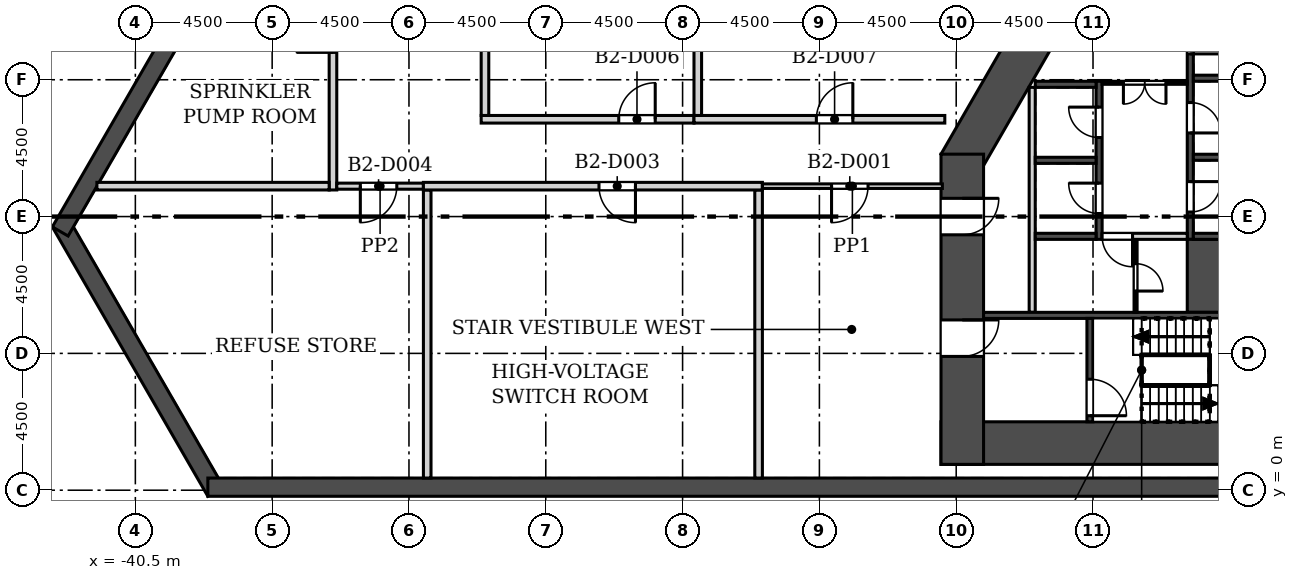
"""IFC4 building model, lengths in metres.
Left out: names, types, materials, properties, quantities, classifications, styles, units other than length and angle.
Written with IfcOpenShell. Run it as: python <this file> out.ifc"""

import sys

from ifc_helpers import new_model, si_unit, direction, frame, frame_2d, origin, place, context, subcontext, project, spatial, rectangle, extrude, element, fill, save


model = new_model("IFC4")
c1 = context("Model", 3, precision=1e-05, world=origin(), true_north=direction((0.0, 1.0)))
c2 = subcontext(c1, "Body", "Model", "MODEL_VIEW")
j1 = project(units=[si_unit("LENGTHUNIT", "METRE"), si_unit("PLANEANGLEUNIT", "RADIAN")], contexts=[c1])
p1 = place(None, origin())
s1 = spatial("IfcSite", under=j1, at=p1, CompositionType="ELEMENT")
p2 = place(p1, origin())
s2 = spatial("IfcBuilding", under=s1, at=p2, CompositionType="ELEMENT")
p3 = place(p2, frame((0.0, 0.0, -14.0)))
s3 = spatial("IfcBuildingStorey", under=s2, at=p3, CompositionType="ELEMENT", Elevation=-14.0)
p4 = place(p3, frame((-42.971, 8.81, -0.4), z_axis=(0.0, 0.0, 1.0), x_axis=(0.499996492717, -0.866027428706, 0.0)))
e1 = element("IfcWall", 1, at=p4, inside=s3, PredefinedType="SOLIDWALL", context=c2, shape_type="SweptSolid", body=[
    extrude(rectangle(XDim=10.231, YDim=0.6, at=frame_2d((5.115, 0.0))), origin(), (0.0, 0.0, 1.0), 6.4),
])
for number, where, z_axis, x_axis in (
    (2, (-38.115, 0.1, -0.4), (0.0, 0.0, 1.0), (1.0, 0.0, 0.0)),
    (3, (-4.856, 74.528, -0.4), (0.0, 0.0, 1.0), (-0.5, -0.866, 0.0)),
):
    element("IfcWall", number, at=place(p3, frame(where, z_axis=z_axis, x_axis=x_axis)), inside=s3, PredefinedType="SOLIDWALL", context=c2, shape_type="SweptSolid", body=[
        extrude(rectangle(XDim=76.231, YDim=0.6, at=frame_2d((38.115, 0.0))), origin(), (0.0, 0.0, 1.0), 6.4),
    ])
p5 = place(p3, frame((-14.0, 1.55, 0.0), z_axis=(0.0, 0.0, 1.0), x_axis=(1.0, 0.0, 0.0)))
e4 = element("IfcWall", 4, at=p5, inside=s3, PredefinedType="SHEAR", context=c2, shape_type="SweptSolid", body=[
    extrude(rectangle(XDim=28.0, YDim=1.4, at=frame_2d((14.0, 0.0))), origin(), (0.0, 0.0, 1.0), 6.0),
])
p6 = place(p3, frame((-8.805, 18.65, 0.0), z_axis=(0.0, 0.0, 1.0), x_axis=(-0.50000187635, -0.866024320471, 0.0)))
e5 = element("IfcWall", 5, at=p6, inside=s3, PredefinedType="SHEAR", context=c2, shape_type="SweptSolid", body=[
    extrude(rectangle(XDim=9.177, YDim=1.4, at=frame_2d((4.588, 0.0))), origin(), (0.0, 0.0, 1.0), 6.0),
])
p7 = place(p3, frame((-13.3, 11.052, 0.0), z_axis=(0.0, 0.0, 1.0), x_axis=(0.0, -1.0, 0.0)))
e6 = element("IfcWall", 6, at=p7, inside=s3, PredefinedType="SHEAR", context=c2, shape_type="SweptSolid", body=[
    extrude(rectangle(XDim=10.202, YDim=1.4, at=frame_2d((5.101, 0.0))), origin(), (0.0, 0.0, 1.0), 6.0),
])
p8 = place(p7, frame((5.453, 0.0, 0.0)))
e7 = element("IfcOpeningElement", 7, at=p8, cuts=e6, PredefinedType="OPENING", context=c2, shape_type="SweptSolid", body=[
    extrude(rectangle(XDim=1.2, YDim=2.1, at=frame_2d((0.6, 1.05))), frame((0.0, 0.71, 0.0), z_axis=(0.0, -1.0, 0.0), x_axis=(1.0, 0.0, 0.0)), (0.0, 0.0, 1.0), 1.42),
])
p9 = place(p7, frame((1.453, 0.0, 0.0)))
e8 = element("IfcOpeningElement", 8, at=p9, cuts=e6, PredefinedType="OPENING", context=c2, shape_type="SweptSolid", body=[
    extrude(rectangle(XDim=1.2, YDim=2.1, at=frame_2d((0.6, 1.05))), frame((0.0, 0.71, 0.0), z_axis=(0.0, -1.0, 0.0), x_axis=(1.0, 0.0, 0.0)), (0.0, 0.0, 1.0), 1.42),
])
p10 = place(p3, frame((-11.0, 5.85, 0.0), z_axis=(0.0, 0.0, 1.0), x_axis=(0.0, 1.0, 0.0)))
e9 = element("IfcWall", 9, at=p10, inside=s3, PredefinedType="SOLIDWALL", context=c2, shape_type="SweptSolid", body=[
    extrude(rectangle(XDim=7.4, YDim=0.2, at=frame_2d((3.7, 0.0))), origin(), (0.0, 0.0, 1.0), 5.65),
])
p11 = place(p3, frame((-8.8, 8.25, 0.0), z_axis=(0.0, 0.0, 1.0), x_axis=(0.0, 1.0, 0.0)))
e10 = element("IfcWall", 10, at=p11, inside=s3, PredefinedType="SOLIDWALL", context=c2, shape_type="SweptSolid", body=[
    extrude(rectangle(XDim=5.2, YDim=0.2, at=frame_2d((2.6, 0.0))), origin(), (0.0, 0.0, 1.0), 5.65),
])
p12 = place(p11, frame((0.85, 0.0, 0.0)))
e11 = element("IfcOpeningElement", 11, at=p12, cuts=e10, PredefinedType="OPENING", context=c2, shape_type="SweptSolid", body=[
    extrude(rectangle(XDim=1.0, YDim=2.1, at=frame_2d((0.5, 1.05))), frame((0.0, 0.11, 0.0), z_axis=(0.0, -1.0, 0.0), x_axis=(1.0, 0.0, 0.0)), (0.0, 0.0, 1.0), 0.22),
])
p13 = place(p11, frame((3.35, 0.0, 0.0)))
e12 = element("IfcOpeningElement", 12, at=p13, cuts=e10, PredefinedType="OPENING", context=c2, shape_type="SweptSolid", body=[
    extrude(rectangle(XDim=1.0, YDim=2.1, at=frame_2d((0.5, 1.05))), frame((0.0, 0.11, 0.0), z_axis=(0.0, -1.0, 0.0), x_axis=(1.0, 0.0, 0.0)), (0.0, 0.0, 1.0), 0.22),
])
p14 = place(p3, frame((-5.8, 8.25, 0.0), z_axis=(0.0, 0.0, 1.0), x_axis=(0.0, 1.0, 0.0)))
e13 = element("IfcWall", 13, at=p14, inside=s3, PredefinedType="SOLIDWALL", context=c2, shape_type="SweptSolid", body=[
    extrude(rectangle(XDim=8.0, YDim=0.2, at=frame_2d((4.0, 0.0))), origin(), (0.0, 0.0, 1.0), 5.65),
])
p15 = place(p14, frame((0.9, 0.0, 0.0)))
e14 = element("IfcOpeningElement", 14, at=p15, cuts=e13, PredefinedType="OPENING", context=c2, shape_type="SweptSolid", body=[
    extrude(rectangle(XDim=1.0, YDim=2.1, at=frame_2d((0.5, 1.05))), frame((0.0, 0.11, 0.0), z_axis=(0.0, -1.0, 0.0), x_axis=(1.0, 0.0, 0.0)), (0.0, 0.0, 1.0), 0.22),
])
p16 = place(p14, frame((3.5, 0.0, 0.0)))
e15 = element("IfcOpeningElement", 15, at=p16, cuts=e13, PredefinedType="OPENING", context=c2, shape_type="SweptSolid", body=[
    extrude(rectangle(XDim=1.0, YDim=2.1, at=frame_2d((0.5, 1.05))), frame((0.0, 0.11, 0.0), z_axis=(0.0, -1.0, 0.0), x_axis=(1.0, 0.0, 0.0)), (0.0, 0.0, 1.0), 0.22),
])
p17 = place(p14, frame((6.1, 0.0, 0.0)))
e16 = element("IfcOpeningElement", 16, at=p17, cuts=e13, PredefinedType="OPENING", context=c2, shape_type="SweptSolid", body=[
    extrude(rectangle(XDim=1.0, YDim=2.1, at=frame_2d((0.5, 1.05))), frame((0.0, 0.11, 0.0), z_axis=(0.0, -1.0, 0.0), x_axis=(1.0, 0.0, 0.0)), (0.0, 0.0, 1.0), 0.22),
])
p18 = place(p3, frame((-5.2, 5.85, 0.0), z_axis=(0.0, 0.0, 1.0), x_axis=(0.0, 1.0, 0.0)))
e17 = element("IfcWall", 17, at=p18, inside=s3, PredefinedType="SOLIDWALL", context=c2, shape_type="SweptSolid", body=[
    extrude(rectangle(XDim=2.4, YDim=1.4, at=frame_2d((1.2, 0.0))), origin(), (0.0, 0.0, 1.0), 5.65),
])
p19 = place(p3, frame((-10.9, 8.35, 0.0), z_axis=(0.0, 0.0, 1.0), x_axis=(1.0, 0.0, 0.0)))
e18 = element("IfcWall", 18, at=p19, inside=s3, PredefinedType="SOLIDWALL", context=c2, shape_type="SweptSolid", body=[
    extrude(rectangle(XDim=2.0, YDim=0.2, at=frame_2d((1.0, 0.0))), origin(), (0.0, 0.0, 1.0), 5.65),
])
p20 = place(p3, frame((-5.7, 8.35, 0.0), z_axis=(0.0, 0.0, 1.0), x_axis=(1.0, 0.0, 0.0)))
e19 = element("IfcWall", 19, at=p20, inside=s3, PredefinedType="SOLIDWALL", context=c2, shape_type="SweptSolid", body=[
    extrude(rectangle(XDim=4.2, YDim=0.2, at=frame_2d((2.1, 0.0))), origin(), (0.0, 0.0, 1.0), 5.65),
])
p21 = place(p3, frame((-12.6, 5.75, 0.0), z_axis=(0.0, 0.0, 1.0), x_axis=(1.0, 0.0, 0.0)))
e20 = element("IfcWall", 20, at=p21, inside=s3, PredefinedType="SOLIDWALL", context=c2, shape_type="SweptSolid", body=[
    extrude(rectangle(XDim=11.4, YDim=0.2, at=frame_2d((5.7, 0.0))), origin(), (0.0, 0.0, 1.0), 5.65),
])
p22 = place(p3, frame((-9.1, 2.25, 0.0), z_axis=(0.0, 0.0, 1.0), x_axis=(0.0, 1.0, 0.0)))
e21 = element("IfcWall", 21, at=p22, inside=s3, PredefinedType="SOLIDWALL", context=c2, shape_type="SweptSolid", body=[
    extrude(rectangle(XDim=3.4, YDim=0.2, at=frame_2d((1.7, 0.0))), origin(), (0.0, 0.0, 1.0), 5.65),
])
p23 = place(p22, frame((0.2, 0.0, 0.0)))
e22 = element("IfcOpeningElement", 22, at=p23, cuts=e21, PredefinedType="OPENING", context=c2, shape_type="SweptSolid", body=[
    extrude(rectangle(XDim=1.2, YDim=2.1, at=frame_2d((0.6, 1.05))), frame((0.0, 0.11, 0.0), z_axis=(0.0, -1.0, 0.0), x_axis=(1.0, 0.0, 0.0)), (0.0, 0.0, 1.0), 0.22),
])
for number, where, z_axis, x_axis in (
    (23, (-10.9, 10.85, 0.0), (0.0, 0.0, 1.0), (1.0, 0.0, 0.0)),
    (24, (-10.9, 13.35, 0.0), (0.0, 0.0, 1.0), (1.0, 0.0, 0.0)),
    (25, (-5.7, 10.95, 0.0), (0.0, 0.0, 1.0), (1.0, 0.0, 0.0)),
    (26, (-5.7, 13.55, 0.0), (0.0, 0.0, 1.0), (1.0, 0.0, 0.0)),
):
    element("IfcWall", number, at=place(p3, frame(where, z_axis=z_axis, x_axis=x_axis)), inside=s3, PredefinedType="SOLIDWALL", context=c2, shape_type="SweptSolid", body=[
        extrude(rectangle(XDim=2.0, YDim=0.2, at=frame_2d((1.0, 0.0))), origin(), (0.0, 0.0, 1.0), 5.65),
    ])
p24 = place(p3, frame((-8.7, 13.4, 0.0), z_axis=(0.0, 0.0, 1.0), x_axis=(1.0, 0.0, 0.0)))
e27 = element("IfcWall", 27, at=p24, inside=s3, PredefinedType="PARTITIONING", context=c2, shape_type="SweptSolid", body=[
    extrude(rectangle(XDim=2.8, YDim=0.1, at=frame_2d((1.4, 0.0))), origin(), (0.0, 0.0, 1.0), 5.65),
])
p25 = place(p24, frame((0.7, 0.0, 0.0)))
e28 = element("IfcOpeningElement", 28, at=p25, cuts=e27, PredefinedType="OPENING", context=c2, shape_type="SweptSolid", body=[
    extrude(rectangle(XDim=1.4, YDim=2.1, at=frame_2d((0.7, 1.05))), frame((0.0, 0.06, 0.0), z_axis=(0.0, -1.0, 0.0), x_axis=(1.0, 0.0, 0.0)), (0.0, 0.0, 1.0), 0.12),
])
p26 = place(p3, frame((-7.6, 5.85, 0.0), z_axis=(0.0, 0.0, 1.0), x_axis=(0.0, 1.0, 0.0)))
e29 = element("IfcWall", 29, at=p26, inside=s3, PredefinedType="PARTITIONING", context=c2, shape_type="SweptSolid", body=[
    extrude(rectangle(XDim=2.4, YDim=0.1, at=frame_2d((1.2, 0.0))), origin(), (0.0, 0.0, 1.0), 5.65),
])
p27 = place(p26, frame((0.7, 0.0, 0.0)))
e30 = element("IfcOpeningElement", 30, at=p27, cuts=e29, PredefinedType="OPENING", context=c2, shape_type="SweptSolid", body=[
    extrude(rectangle(XDim=0.9, YDim=2.1, at=frame_2d((0.45, 1.05))), frame((0.0, 0.06, 0.0), z_axis=(0.0, -1.0, 0.0), x_axis=(1.0, 0.0, 0.0)), (0.0, 0.0, 1.0), 0.12),
])
p28 = place(p3, frame((-8.7, 8.35, 0.0), z_axis=(0.0, 0.0, 1.0), x_axis=(1.0, 0.0, 0.0)))
e31 = element("IfcWall", 31, at=p28, inside=s3, PredefinedType="SOLIDWALL", context=c2, shape_type="SweptSolid", body=[
    extrude(rectangle(XDim=2.8, YDim=0.2, at=frame_2d((1.4, 0.0))), origin(), (0.0, 0.0, 1.0), 5.65),
])
p29 = place(p28, origin())
e32 = element("IfcOpeningElement", 32, at=p29, cuts=e31, PredefinedType="OPENING", context=c2, shape_type="SweptSolid", body=[
    extrude(rectangle(XDim=1.0, YDim=2.1, at=frame_2d((0.5, 1.05))), frame((0.0, 0.11, 0.0), z_axis=(0.0, -1.0, 0.0), x_axis=(1.0, 0.0, 0.0)), (0.0, 0.0, 1.0), 0.22),
])
for number, where, z_axis, x_axis in (
    (33, (-30.9, 0.4, 0.0), (0.0, 0.0, 1.0), (0.0, 1.0, 0.0)),
    (34, (-20.0, 0.4, 0.0), (0.0, 0.0, 1.0), (0.0, 1.0, 0.0)),
):
    element("IfcWall", number, at=place(p3, frame(where, z_axis=z_axis, x_axis=x_axis)), inside=s3, PredefinedType="SOLIDWALL", context=c2, shape_type="SweptSolid", body=[
        extrude(rectangle(XDim=9.475, YDim=0.25, at=frame_2d((4.738, 0.0))), origin(), (0.0, 0.0, 1.0), 5.65),
    ])
p30 = place(p3, frame((-34.0, 9.875, 0.0), z_axis=(0.0, 0.0, 1.0), x_axis=(0.0, 1.0, 0.0)))
e35 = element("IfcWall", 35, at=p30, inside=s3, PredefinedType="SOLIDWALL", context=c2, shape_type="SweptSolid", body=[
    extrude(rectangle(XDim=12.5, YDim=0.25, at=frame_2d((6.25, 0.0))), origin(), (0.0, 0.0, 1.0), 5.65),
])
p31 = place(p30, frame((4.525, 0.0, 0.0)))
e36 = element("IfcOpeningElement", 36, at=p31, cuts=e35, PredefinedType="OPENING", context=c2, shape_type="SweptSolid", body=[
    extrude(rectangle(XDim=1.2, YDim=2.1, at=frame_2d((0.6, 1.05))), frame((0.0, 0.135, 0.0), z_axis=(0.0, -1.0, 0.0), x_axis=(1.0, 0.0, 0.0)), (0.0, 0.0, 1.0), 0.27),
])
p32 = place(p3, frame((-41.765, 10.0, 0.0), z_axis=(0.0, 0.0, 1.0), x_axis=(1.0, 0.0, 0.0)))
e37 = element("IfcWall", 37, at=p32, inside=s3, PredefinedType="SOLIDWALL", context=c2, shape_type="SweptSolid", body=[
    extrude(rectangle(XDim=7.64, YDim=0.25, at=frame_2d((3.82, 0.0))), origin(), (0.0, 0.0, 1.0), 5.65),
])
p33 = place(p3, frame((-31.025, 10.0, 0.0), z_axis=(0.0, 0.0, 1.0), x_axis=(-1.0, 0.0, 0.0)))
e38 = element("IfcWall", 38, at=p33, inside=s3, PredefinedType="PARTITIONING", context=c2, shape_type="SweptSolid", body=[
    extrude(rectangle(XDim=2.85, YDim=0.2, at=frame_2d((1.425, 0.0))), origin(), (0.0, 0.0, 1.0), 5.65),
])
p34 = place(p33, frame((0.875, 0.0, 0.0)))
e39 = element("IfcOpeningElement", 39, at=p34, cuts=e38, PredefinedType="OPENING", context=c2, shape_type="SweptSolid", body=[
    extrude(rectangle(XDim=1.2, YDim=2.1, at=frame_2d((0.6, 1.05))), frame((0.0, 0.11, 0.0), z_axis=(0.0, -1.0, 0.0), x_axis=(1.0, 0.0, 0.0)), (0.0, 0.0, 1.0), 0.22),
])
p35 = place(p3, frame((-19.875, 10.0, 0.0), z_axis=(0.0, 0.0, 1.0), x_axis=(-1.0, 0.0, 0.0)))
e40 = element("IfcWall", 40, at=p35, inside=s3, PredefinedType="SOLIDWALL", context=c2, shape_type="SweptSolid", body=[
    extrude(rectangle(XDim=11.15, YDim=0.25, at=frame_2d((5.575, 0.0))), origin(), (0.0, 0.0, 1.0), 5.65),
])
p36 = place(p35, frame((4.175, 0.0, 0.0)))
e41 = element("IfcOpeningElement", 41, at=p36, cuts=e40, PredefinedType="OPENING", context=c2, shape_type="SweptSolid", body=[
    extrude(rectangle(XDim=1.2, YDim=2.1, at=frame_2d((0.6, 1.05))), frame((0.0, 0.135, 0.0), z_axis=(0.0, -1.0, 0.0), x_axis=(1.0, 0.0, 0.0)), (0.0, 0.0, 1.0), 0.27),
])
p37 = place(p3, frame((-19.875, 10.0, 0.0), z_axis=(0.0, 0.0, 1.0), x_axis=(1.0, 0.0, 0.0)))
e42 = element("IfcWall", 42, at=p37, inside=s3, PredefinedType="PARTITIONING", context=c2, shape_type="SweptSolid", body=[
    extrude(rectangle(XDim=5.92, YDim=0.15, at=frame_2d((2.96, 0.0))), origin(), (0.0, 0.0, 1.0), 5.65),
])
p38 = place(p37, frame((2.275, 0.0, 0.0)))
e43 = element("IfcOpeningElement", 43, at=p38, cuts=e42, PredefinedType="OPENING", context=c2, shape_type="SweptSolid", body=[
    extrude(rectangle(XDim=1.2, YDim=2.1, at=frame_2d((0.6, 1.05))), frame((0.0, 0.085, 0.0), z_axis=(0.0, -1.0, 0.0), x_axis=(1.0, 0.0, 0.0)), (0.0, 0.0, 1.0), 0.17),
])
p39 = place(p3, frame((-29.125, 12.2, 0.0), z_axis=(0.0, 0.0, 1.0), x_axis=(1.0, 0.0, 0.0)))
e44 = element("IfcWall", 44, at=p39, inside=s3, PredefinedType="SOLIDWALL", context=c2, shape_type="SweptSolid", body=[
    extrude(rectangle(XDim=7.0, YDim=0.25, at=frame_2d((3.5, 0.0))), origin(), (0.0, 0.0, 1.0), 5.65),
])
p40 = place(p39, frame((4.525, 0.0, 0.0)))
e45 = element("IfcOpeningElement", 45, at=p40, cuts=e44, PredefinedType="OPENING", context=c2, shape_type="SweptSolid", body=[
    extrude(rectangle(XDim=1.2, YDim=2.1, at=frame_2d((0.6, 1.05))), frame((0.0, 0.135, 0.0), z_axis=(0.0, -1.0, 0.0), x_axis=(1.0, 0.0, 0.0)), (0.0, 0.0, 1.0), 0.27),
])
p41 = place(p3, frame((-22.125, 12.2, 0.0), z_axis=(0.0, 0.0, 1.0), x_axis=(1.0, 0.0, 0.0)))
e46 = element("IfcWall", 46, at=p41, inside=s3, PredefinedType="SOLIDWALL", context=c2, shape_type="SweptSolid", body=[
    extrude(rectangle(XDim=8.25, YDim=0.25, at=frame_2d((4.125, 0.0))), origin(), (0.0, 0.0, 1.0), 5.65),
])
p42 = place(p41, frame((4.025, 0.0, 0.0)))
e47 = element("IfcOpeningElement", 47, at=p42, cuts=e46, PredefinedType="OPENING", context=c2, shape_type="SweptSolid", body=[
    extrude(rectangle(XDim=1.2, YDim=2.1, at=frame_2d((0.6, 1.05))), frame((0.0, 0.135, 0.0), z_axis=(0.0, -1.0, 0.0), x_axis=(1.0, 0.0, 0.0)), (0.0, 0.0, 1.0), 0.27),
])
for number, where, z_axis, x_axis in (
    (48, (-29.0, 17.875, 0.0), (0.0, 0.0, 1.0), (0.0, -1.0, 0.0)),
    (49, (-22.0, 17.875, 0.0), (0.0, 0.0, 1.0), (0.0, -1.0, 0.0)),
):
    element("IfcWall", number, at=place(p3, frame(where, z_axis=z_axis, x_axis=x_axis)), inside=s3, PredefinedType="SOLIDWALL", context=c2, shape_type="SweptSolid", body=[
        extrude(rectangle(XDim=5.55, YDim=0.25, at=frame_2d((2.775, 0.0))), origin(), (0.0, 0.0, 1.0), 5.65),
    ])
p43 = place(p12, origin())
e50 = element("IfcDoor", 50, at=p43, inside=s3, OperationType="SINGLE_SWING_RIGHT", PredefinedType="DOOR", context=c2, shape_type="SweptSolid", body=[
    extrude(rectangle(XDim=1.0, YDim=2.1, at=frame_2d((0.5, 1.05))), frame((0.0, 0.025, 0.0), z_axis=(0.0, -1.0, 0.0), x_axis=(1.0, 0.0, 0.0)), (0.0, 0.0, 1.0), 0.05),
])
fill(e11, e50)
p44 = place(p13, origin())
e51 = element("IfcDoor", 51, at=p44, inside=s3, OperationType="SINGLE_SWING_RIGHT", PredefinedType="DOOR", context=c2, shape_type="SweptSolid", body=[
    extrude(rectangle(XDim=1.0, YDim=2.1, at=frame_2d((0.5, 1.05))), frame((0.0, 0.025, 0.0), z_axis=(0.0, -1.0, 0.0), x_axis=(1.0, 0.0, 0.0)), (0.0, 0.0, 1.0), 0.05),
])
fill(e12, e51)
p45 = place(p15, frame((1.0, 0.0, 0.0), z_axis=(0.0, 0.0, 1.0), x_axis=(-1.0, 0.0, 0.0)))
e52 = element("IfcDoor", 52, at=p45, inside=s3, OperationType="SINGLE_SWING_LEFT", PredefinedType="DOOR", context=c2, shape_type="SweptSolid", body=[
    extrude(rectangle(XDim=1.0, YDim=2.1, at=frame_2d((0.5, 1.05))), frame((0.0, 0.025, 0.0), z_axis=(0.0, -1.0, 0.0), x_axis=(1.0, 0.0, 0.0)), (0.0, 0.0, 1.0), 0.05),
])
fill(e14, e52)
p46 = place(p16, frame((1.0, 0.0, 0.0), z_axis=(0.0, 0.0, 1.0), x_axis=(-1.0, 0.0, 0.0)))
e53 = element("IfcDoor", 53, at=p46, inside=s3, OperationType="SINGLE_SWING_RIGHT", PredefinedType="DOOR", context=c2, shape_type="SweptSolid", body=[
    extrude(rectangle(XDim=1.0, YDim=2.1, at=frame_2d((0.5, 1.05))), frame((0.0, 0.025, 0.0), z_axis=(0.0, -1.0, 0.0), x_axis=(1.0, 0.0, 0.0)), (0.0, 0.0, 1.0), 0.05),
])
fill(e15, e53)
p47 = place(p17, frame((1.0, 0.0, 0.0), z_axis=(0.0, 0.0, 1.0), x_axis=(-1.0, 0.0, 0.0)))
e54 = element("IfcDoor", 54, at=p47, inside=s3, OperationType="SINGLE_SWING_RIGHT", PredefinedType="DOOR", context=c2, shape_type="SweptSolid", body=[
    extrude(rectangle(XDim=1.0, YDim=2.1, at=frame_2d((0.5, 1.05))), frame((0.0, 0.025, 0.0), z_axis=(0.0, -1.0, 0.0), x_axis=(1.0, 0.0, 0.0)), (0.0, 0.0, 1.0), 0.05),
])
fill(e16, e54)
p48 = place(p25, frame((1.4, 0.0, 0.0), z_axis=(0.0, 0.0, 1.0), x_axis=(-1.0, 0.0, 0.0)))
e55 = element("IfcDoor", 55, at=p48, inside=s3, OperationType="DOUBLE_DOOR_SINGLE_SWING", PredefinedType="DOOR", context=c2, shape_type="SweptSolid", body=[
    extrude(rectangle(XDim=1.4, YDim=2.1, at=frame_2d((0.7, 1.05))), frame((0.0, 0.025, 0.0), z_axis=(0.0, -1.0, 0.0), x_axis=(1.0, 0.0, 0.0)), (0.0, 0.0, 1.0), 0.05),
])
fill(e28, e55)
p49 = place(p29, frame((1.0, 0.0, 0.0), z_axis=(0.0, 0.0, 1.0), x_axis=(-1.0, 0.0, 0.0)))
e56 = element("IfcDoor", 56, at=p49, inside=s3, OperationType="SINGLE_SWING_LEFT", PredefinedType="DOOR", context=c2, shape_type="SweptSolid", body=[
    extrude(rectangle(XDim=1.0, YDim=2.1, at=frame_2d((0.5, 1.05))), frame((0.0, 0.025, 0.0), z_axis=(0.0, -1.0, 0.0), x_axis=(1.0, 0.0, 0.0)), (0.0, 0.0, 1.0), 0.05),
])
fill(e32, e56)
p50 = place(p27, frame((0.9, 0.0, 0.0), z_axis=(0.0, 0.0, 1.0), x_axis=(-1.0, 0.0, 0.0)))
e57 = element("IfcDoor", 57, at=p50, inside=s3, OperationType="SINGLE_SWING_RIGHT", PredefinedType="DOOR", context=c2, shape_type="SweptSolid", body=[
    extrude(rectangle(XDim=0.9, YDim=2.1, at=frame_2d((0.45, 1.05))), frame((0.0, 0.025, 0.0), z_axis=(0.0, -1.0, 0.0), x_axis=(1.0, 0.0, 0.0)), (0.0, 0.0, 1.0), 0.05),
])
fill(e30, e57)
p51 = place(p8, origin())
e58 = element("IfcDoor", 58, at=p51, inside=s3, OperationType="SINGLE_SWING_LEFT", PredefinedType="DOOR", context=c2, shape_type="SweptSolid", body=[
    extrude(rectangle(XDim=1.2, YDim=2.1, at=frame_2d((0.6, 1.05))), frame((0.0, 0.025, 0.0), z_axis=(0.0, -1.0, 0.0), x_axis=(1.0, 0.0, 0.0)), (0.0, 0.0, 1.0), 0.05),
])
fill(e7, e58)
p52 = place(p23, frame((1.2, 0.0, 0.0), z_axis=(0.0, 0.0, 1.0), x_axis=(-1.0, 0.0, 0.0)))
e59 = element("IfcDoor", 59, at=p52, inside=s3, OperationType="SINGLE_SWING_RIGHT", PredefinedType="DOOR", context=c2, shape_type="SweptSolid", body=[
    extrude(rectangle(XDim=1.2, YDim=2.1, at=frame_2d((0.6, 1.05))), frame((0.0, 0.025, 0.0), z_axis=(0.0, -1.0, 0.0), x_axis=(1.0, 0.0, 0.0)), (0.0, 0.0, 1.0), 0.05),
])
fill(e22, e59)
p53 = place(p9, origin())
e60 = element("IfcDoor", 60, at=p53, inside=s3, OperationType="SINGLE_SWING_LEFT", PredefinedType="DOOR", context=c2, shape_type="SweptSolid", body=[
    extrude(rectangle(XDim=1.2, YDim=2.1, at=frame_2d((0.6, 1.05))), frame((0.0, 0.025, 0.0), z_axis=(0.0, -1.0, 0.0), x_axis=(1.0, 0.0, 0.0)), (0.0, 0.0, 1.0), 0.05),
])
fill(e8, e60)
p54 = place(p38, frame((1.2, 0.0, 0.0), z_axis=(0.0, 0.0, 1.0), x_axis=(-1.0, 0.0, 0.0)))
e61 = element("IfcDoor", 61, at=p54, inside=s3, OperationType="SINGLE_SWING_RIGHT", PredefinedType="DOOR", context=c2, shape_type="SweptSolid", body=[
    extrude(rectangle(XDim=1.2, YDim=2.1, at=frame_2d((0.6, 1.05))), frame((0.0, 0.025, 0.0), z_axis=(0.0, -1.0, 0.0), x_axis=(1.0, 0.0, 0.0)), (0.0, 0.0, 1.0), 0.05),
])
fill(e43, e61)
p55 = place(p36, origin())
e62 = element("IfcDoor", 62, at=p55, inside=s3, OperationType="SINGLE_SWING_LEFT", PredefinedType="DOOR", context=c2, shape_type="SweptSolid", body=[
    extrude(rectangle(XDim=1.2, YDim=2.1, at=frame_2d((0.6, 1.05))), frame((0.0, 0.025, 0.0), z_axis=(0.0, -1.0, 0.0), x_axis=(1.0, 0.0, 0.0)), (0.0, 0.0, 1.0), 0.05),
])
fill(e41, e62)
p56 = place(p34, origin())
e63 = element("IfcDoor", 63, at=p56, inside=s3, OperationType="SINGLE_SWING_RIGHT", PredefinedType="DOOR", context=c2, shape_type="SweptSolid", body=[
    extrude(rectangle(XDim=1.2, YDim=2.1, at=frame_2d((0.6, 1.05))), frame((0.0, 0.025, 0.0), z_axis=(0.0, -1.0, 0.0), x_axis=(1.0, 0.0, 0.0)), (0.0, 0.0, 1.0), 0.05),
])
fill(e39, e63)
p57 = place(p40, origin())
e64 = element("IfcDoor", 64, at=p57, inside=s3, OperationType="SINGLE_SWING_RIGHT", PredefinedType="DOOR", context=c2, shape_type="SweptSolid", body=[
    extrude(rectangle(XDim=1.2, YDim=2.1, at=frame_2d((0.6, 1.05))), frame((0.0, 0.025, 0.0), z_axis=(0.0, -1.0, 0.0), x_axis=(1.0, 0.0, 0.0)), (0.0, 0.0, 1.0), 0.05),
])
fill(e45, e64)
p58 = place(p42, origin())
e65 = element("IfcDoor", 65, at=p58, inside=s3, OperationType="SINGLE_SWING_RIGHT", PredefinedType="DOOR", context=c2, shape_type="SweptSolid", body=[
    extrude(rectangle(XDim=1.2, YDim=2.1, at=frame_2d((0.6, 1.05))), frame((0.0, 0.025, 0.0), z_axis=(0.0, -1.0, 0.0), x_axis=(1.0, 0.0, 0.0)), (0.0, 0.0, 1.0), 0.05),
])
fill(e47, e65)
save(model, sys.argv[1])
